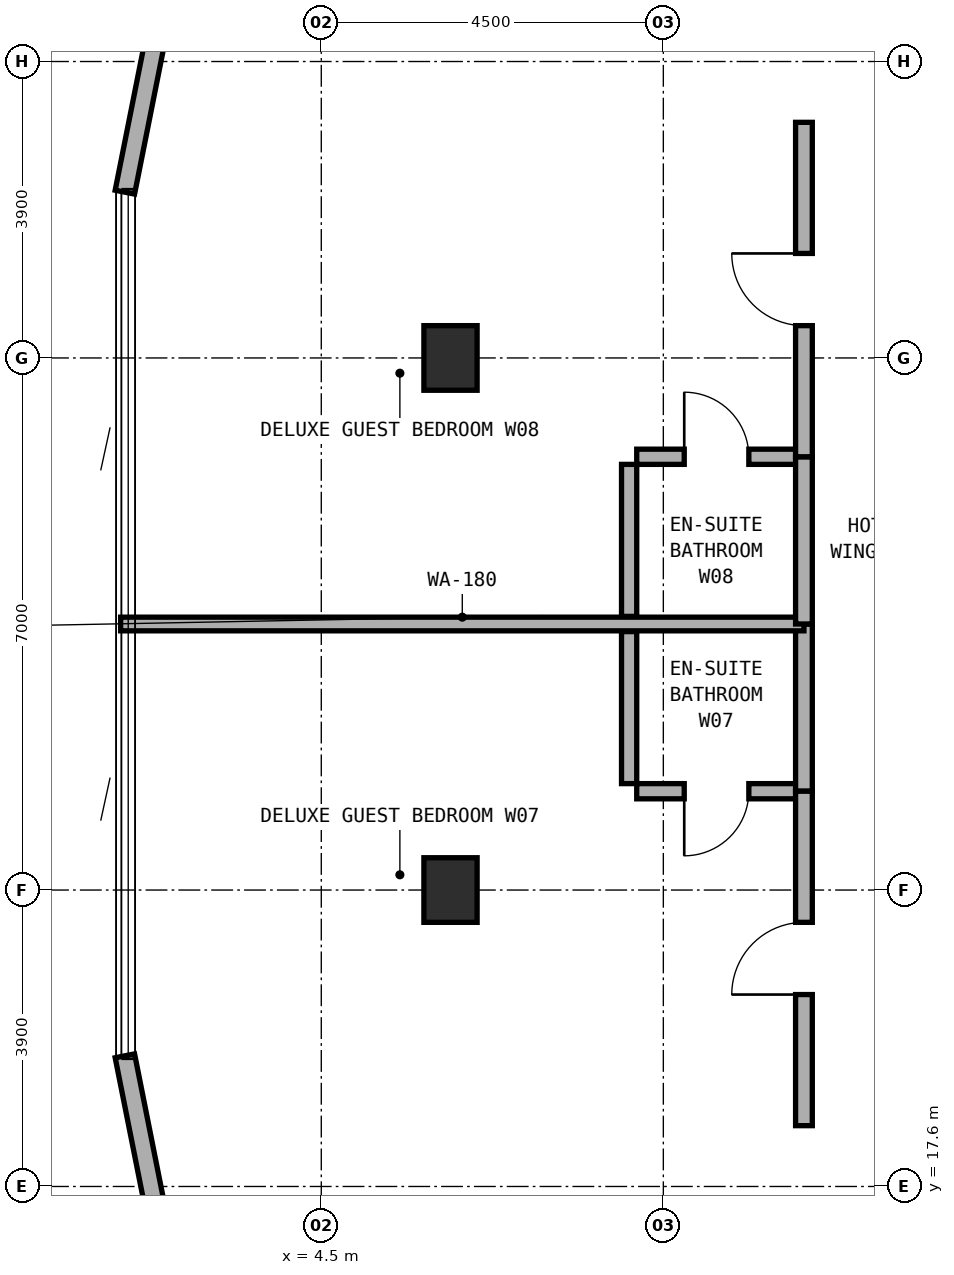
"""IFC4 building model, lengths in metres.
Left out: names, types, materials, properties, quantities, classifications, styles, units other than length and angle.
Written with IfcOpenShell. Run it as: python <this file> out.ifc"""

import sys

from ifc_helpers import new_model, si_unit, direction, frame, frame_2d, origin, origin_2d, place, context, subcontext, project, spatial, rectangle, extrude, element, fill, save


model = new_model("IFC4")
c1 = context("Model", 3, precision=1e-05, world=origin(), true_north=direction((0.0, 1.0)))
c2 = subcontext(c1, "Body", "Model", "MODEL_VIEW")
j1 = project(units=[si_unit("LENGTHUNIT", "METRE"), si_unit("PLANEANGLEUNIT", "RADIAN")], contexts=[c1])
p1 = place(None, origin())
s1 = spatial("IfcSite", under=j1, at=p1, CompositionType="ELEMENT")
p2 = place(p1, origin())
s2 = spatial("IfcBuilding", under=s1, at=p2, CompositionType="ELEMENT")
p3 = place(p2, frame((0.0, 0.0, 220.7)))
s3 = spatial("IfcBuildingStorey", under=s2, at=p3, CompositionType="ELEMENT", Elevation=220.7)
for number, where, z_axis, x_axis in (
    (1, (6.2, 21.5, 0.0), (0.0, 0.0, 1.0), (1.0, 0.0, 0.0)),
    (2, (6.2, 28.5, 0.0), (0.0, 0.0, 1.0), (1.0, 0.0, 0.0)),
):
    element("IfcColumn", number, at=place(p3, frame(where, z_axis=z_axis, x_axis=x_axis)), inside=s3, PredefinedType="COLUMN", context=c2, shape_type="SweptSolid", body=[
        extrude(rectangle(XDim=0.7, YDim=0.85, at=origin_2d()), origin(), (0.0, 0.0, 1.0), 3.6),
    ])
p4 = place(p3, frame((3.629, 39.283, 0.0), z_axis=(0.0, 0.0, 1.0), x_axis=(-0.195291715883, -0.980745199176, 0.0)))
e3 = element("IfcWall", 3, at=p4, inside=s3, PredefinedType="STANDARD", context=c2, shape_type="SweptSolid", body=[
    extrude(rectangle(XDim=8.771, YDim=0.26, at=frame_2d((4.385, 0.0))), origin(), (0.0, 0.0, 1.0), 3.32),
])
p5 = place(p4, frame((4.0, 0.0, 0.85)))
e4 = element("IfcOpeningElement", 4, at=p5, cuts=e3, PredefinedType="OPENING", context=c2, shape_type="SweptSolid", body=[
    extrude(rectangle(XDim=2.1, YDim=1.5, at=frame_2d((1.05, 0.75))), frame((0.0, 0.14, 0.0), z_axis=(0.0, -1.0, 0.0), x_axis=(1.0, 0.0, 0.0)), (0.0, 0.0, 1.0), 0.28),
])
p6 = place(p3, frame((1.916, 19.319, 0.0), z_axis=(0.0, 0.0, 1.0), x_axis=(0.195291715883, -0.980745199176, 0.0)))
e5 = element("IfcWall", 5, at=p6, inside=s3, PredefinedType="STANDARD", context=c2, shape_type="SweptSolid", body=[
    extrude(rectangle(XDim=8.771, YDim=0.26, at=frame_2d((4.385, 0.0))), origin(), (0.0, 0.0, 1.0), 3.32),
])
p7 = place(p6, frame((2.67, 0.0, 0.85)))
e6 = element("IfcOpeningElement", 6, at=p7, cuts=e5, PredefinedType="OPENING", context=c2, shape_type="SweptSolid", body=[
    extrude(rectangle(XDim=2.1, YDim=1.5, at=frame_2d((1.05, 0.75))), frame((0.0, 0.14, 0.0), z_axis=(0.0, -1.0, 0.0), x_axis=(1.0, 0.0, 0.0)), (0.0, 0.0, 1.0), 0.28),
])
p8 = place(p3, frame((8.65, 22.8, 0.0), z_axis=(0.0, 0.0, 1.0), x_axis=(1.0, 0.0, 0.0)))
e7 = element("IfcWall", 7, at=p8, inside=s3, PredefinedType="PLUMBINGWALL", context=c2, shape_type="SweptSolid", body=[
    extrude(rectangle(XDim=2.1, YDim=0.2, at=frame_2d((1.05, 0.0))), origin(), (0.0, 0.0, 1.0), 3.32),
])
p9 = place(p8, frame((0.625, 0.0, 0.0)))
e8 = element("IfcOpeningElement", 8, at=p9, cuts=e7, PredefinedType="OPENING", context=c2, shape_type="SweptSolid", body=[
    extrude(rectangle(XDim=0.85, YDim=2.1, at=frame_2d((0.425, 1.05))), frame((0.0, 0.11, 0.0), z_axis=(0.0, -1.0, 0.0), x_axis=(1.0, 0.0, 0.0)), (0.0, 0.0, 1.0), 0.22),
])
p10 = place(p3, frame((8.55, 22.9, 0.0), z_axis=(0.0, 0.0, 1.0), x_axis=(0.0, 1.0, 0.0)))
e9 = element("IfcWall", 9, at=p10, inside=s3, PredefinedType="PLUMBINGWALL", context=c2, shape_type="SweptSolid", body=[
    extrude(rectangle(XDim=2.0, YDim=0.2, at=frame_2d((1.0, 0.0))), origin(), (0.0, 0.0, 1.0), 3.32),
])
p11 = place(p3, frame((10.85, 22.8, 0.0), z_axis=(0.0, 0.0, 1.0), x_axis=(0.0, 1.0, 0.0)))
e10 = element("IfcWall", 10, at=p11, inside=s3, PredefinedType="SOLIDWALL", context=c2, shape_type="SweptSolid", body=[
    extrude(rectangle(XDim=2.2, YDim=0.22, at=frame_2d((1.1, 0.0))), origin(), (0.0, 0.0, 1.0), 3.32),
])
p12 = place(p3, frame((10.85, 18.4, 0.0), z_axis=(0.0, 0.0, 1.0), x_axis=(0.0, 1.0, 0.0)))
e11 = element("IfcWall", 11, at=p12, inside=s3, PredefinedType="SOLIDWALL", context=c2, shape_type="SweptSolid", body=[
    extrude(rectangle(XDim=4.4, YDim=0.22, at=frame_2d((2.2, 0.0))), origin(), (0.0, 0.0, 1.0), 2.695),
])
p13 = place(p12, frame((1.725, 0.0, 0.0)))
e12 = element("IfcOpeningElement", 12, at=p13, cuts=e11, PredefinedType="OPENING", context=c2, shape_type="SweptSolid", body=[
    extrude(rectangle(XDim=0.95, YDim=2.1, at=frame_2d((0.475, 1.05))), frame((0.0, 0.12, 0.0), z_axis=(0.0, -1.0, 0.0), x_axis=(1.0, 0.0, 0.0)), (0.0, 0.0, 1.0), 0.24),
])
p14 = place(p3, frame((1.86, 25.0, 0.0), z_axis=(0.0, 0.0, 1.0), x_axis=(1.0, 0.0, 0.0)))
e13 = element("IfcWall", 13, at=p14, inside=s3, PredefinedType="SOLIDWALL", context=c2, shape_type="SweptSolid", body=[
    extrude(rectangle(XDim=8.99, YDim=0.18, at=frame_2d((4.495, 0.0))), origin(), (0.0, 0.0, 1.0), 3.015),
])
p15 = place(p3, frame((8.65, 27.2, 0.0), z_axis=(0.0, 0.0, 1.0), x_axis=(1.0, 0.0, 0.0)))
e14 = element("IfcWall", 14, at=p15, inside=s3, PredefinedType="PLUMBINGWALL", context=c2, shape_type="SweptSolid", body=[
    extrude(rectangle(XDim=2.1, YDim=0.2, at=frame_2d((1.05, 0.0))), origin(), (0.0, 0.0, 1.0), 3.32),
])
p16 = place(p15, frame((0.625, 0.0, 0.0)))
e15 = element("IfcOpeningElement", 15, at=p16, cuts=e14, PredefinedType="OPENING", context=c2, shape_type="SweptSolid", body=[
    extrude(rectangle(XDim=0.85, YDim=2.1, at=frame_2d((0.425, 1.05))), frame((0.0, 0.11, 0.0), z_axis=(0.0, -1.0, 0.0), x_axis=(1.0, 0.0, 0.0)), (0.0, 0.0, 1.0), 0.22),
])
p17 = place(p3, frame((8.55, 25.1, 0.0), z_axis=(0.0, 0.0, 1.0), x_axis=(0.0, 1.0, 0.0)))
e16 = element("IfcWall", 16, at=p17, inside=s3, PredefinedType="PLUMBINGWALL", context=c2, shape_type="SweptSolid", body=[
    extrude(rectangle(XDim=2.0, YDim=0.2, at=frame_2d((1.0, 0.0))), origin(), (0.0, 0.0, 1.0), 3.32),
])
p18 = place(p3, frame((10.85, 25.0, 0.0), z_axis=(0.0, 0.0, 1.0), x_axis=(0.0, 1.0, 0.0)))
e17 = element("IfcWall", 17, at=p18, inside=s3, PredefinedType="SOLIDWALL", context=c2, shape_type="SweptSolid", body=[
    extrude(rectangle(XDim=2.2, YDim=0.22, at=frame_2d((1.1, 0.0))), origin(), (0.0, 0.0, 1.0), 3.32),
])
p19 = place(p3, frame((10.85, 27.2, 0.0), z_axis=(0.0, 0.0, 1.0), x_axis=(0.0, 1.0, 0.0)))
e18 = element("IfcWall", 18, at=p19, inside=s3, PredefinedType="SOLIDWALL", context=c2, shape_type="SweptSolid", body=[
    extrude(rectangle(XDim=4.4, YDim=0.22, at=frame_2d((2.2, 0.0))), origin(), (0.0, 0.0, 1.0), 2.695),
])
p20 = place(p19, frame((1.725, 0.0, 0.0)))
e19 = element("IfcOpeningElement", 19, at=p20, cuts=e18, PredefinedType="OPENING", context=c2, shape_type="SweptSolid", body=[
    extrude(rectangle(XDim=0.95, YDim=2.1, at=frame_2d((0.475, 1.05))), frame((0.0, 0.12, 0.0), z_axis=(0.0, -1.0, 0.0), x_axis=(1.0, 0.0, 0.0)), (0.0, 0.0, 1.0), 0.24),
])
p21 = place(p9, frame((0.85, 0.0, 0.0), z_axis=(0.0, 0.0, 1.0), x_axis=(-1.0, 0.0, 0.0)))
e20 = element("IfcDoor", 20, at=p21, inside=s3, OperationType="SINGLE_SWING_RIGHT", PredefinedType="DOOR", context=c2, shape_type="SweptSolid", body=[
    extrude(rectangle(XDim=0.85, YDim=2.1, at=frame_2d((0.425, 1.05))), frame((0.0, 0.025, 0.0), z_axis=(0.0, -1.0, 0.0), x_axis=(1.0, 0.0, 0.0)), (0.0, 0.0, 1.0), 0.05),
])
fill(e8, e20)
p22 = place(p13, origin())
e21 = element("IfcDoor", 21, at=p22, inside=s3, OperationType="SINGLE_SWING_LEFT", PredefinedType="DOOR", context=c2, shape_type="SweptSolid", body=[
    extrude(rectangle(XDim=0.95, YDim=2.1, at=frame_2d((0.475, 1.05))), frame((0.0, 0.025, 0.0), z_axis=(0.0, -1.0, 0.0), x_axis=(1.0, 0.0, 0.0)), (0.0, 0.0, 1.0), 0.05),
])
fill(e12, e21)
p23 = place(p16, origin())
e22 = element("IfcDoor", 22, at=p23, inside=s3, OperationType="SINGLE_SWING_LEFT", PredefinedType="DOOR", context=c2, shape_type="SweptSolid", body=[
    extrude(rectangle(XDim=0.85, YDim=2.1, at=frame_2d((0.425, 1.05))), frame((0.0, 0.025, 0.0), z_axis=(0.0, -1.0, 0.0), x_axis=(1.0, 0.0, 0.0)), (0.0, 0.0, 1.0), 0.05),
])
fill(e15, e22)
p24 = place(p20, origin())
e23 = element("IfcDoor", 23, at=p24, inside=s3, OperationType="SINGLE_SWING_RIGHT", PredefinedType="DOOR", context=c2, shape_type="SweptSolid", body=[
    extrude(rectangle(XDim=0.95, YDim=2.1, at=frame_2d((0.475, 1.05))), frame((0.0, 0.025, 0.0), z_axis=(0.0, -1.0, 0.0), x_axis=(1.0, 0.0, 0.0)), (0.0, 0.0, 1.0), 0.05),
])
fill(e19, e23)
save(model, sys.argv[1])
